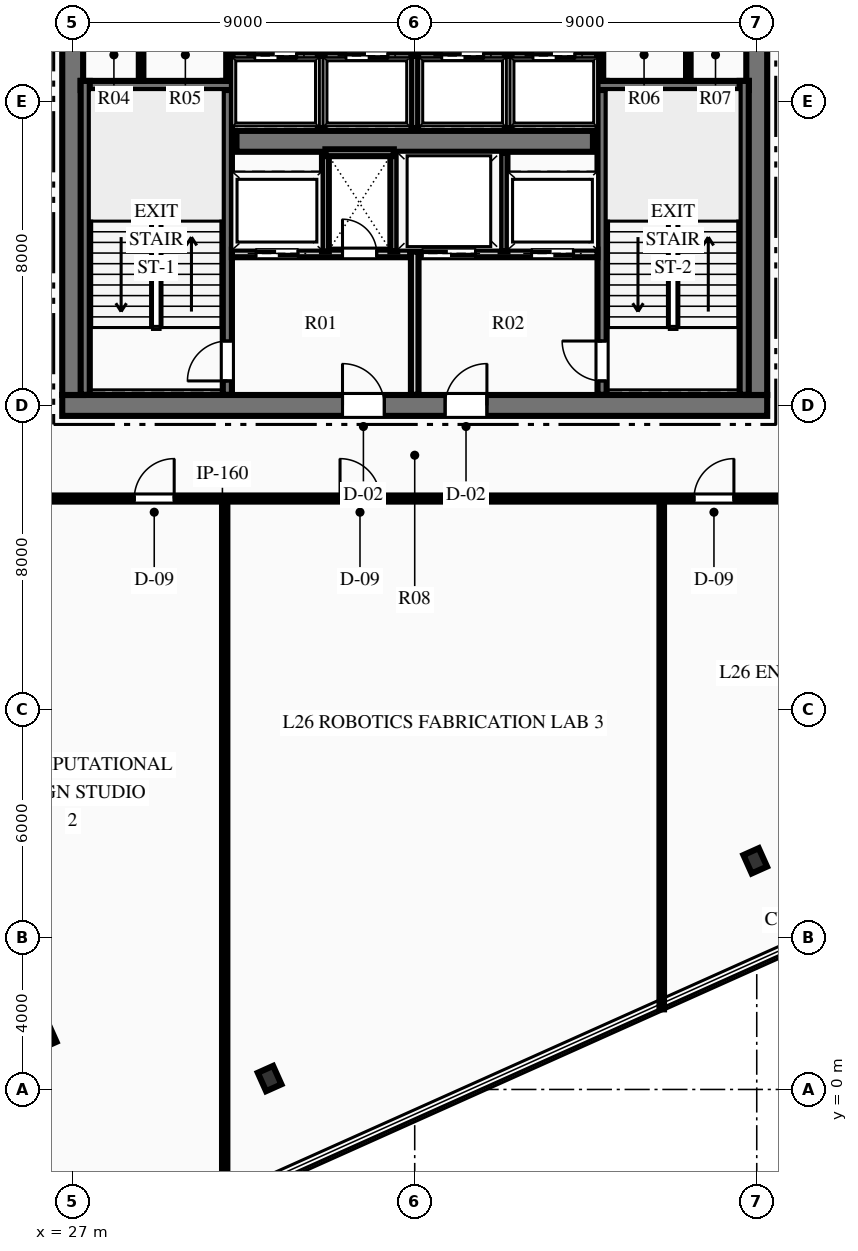
"""IFC4 building model, lengths in metres.
Left out: names, types, materials, properties, quantities, classifications, styles, units other than length and angle.
Written with IfcOpenShell. Run it as: python <this file> out.ifc"""

import sys

from ifc_helpers import new_model, si_unit, direction, frame, frame_2d, origin, origin_2d, place, context, subcontext, project, spatial, rectangle, hollow_rectangle, i_section, extrude, element, fill, save


model = new_model("IFC4")
c1 = context("Model", 3, precision=1e-05, world=origin(), true_north=direction((0.0, 1.0)))
c2 = subcontext(c1, "Body", "Model", "MODEL_VIEW")
j1 = project(units=[si_unit("LENGTHUNIT", "METRE"), si_unit("PLANEANGLEUNIT", "RADIAN")], contexts=[c1])
p1 = place(None, origin())
s1 = spatial("IfcSite", under=j1, at=p1, CompositionType="ELEMENT")
p2 = place(p1, origin())
s2 = spatial("IfcBuilding", under=s1, at=p2, CompositionType="ELEMENT")
p3 = place(p2, frame((0.0, 0.0, 109.2)))
s3 = spatial("IfcBuildingStorey", under=s2, at=p3, CompositionType="ELEMENT", Elevation=109.2)
p4 = place(p3, frame((26.725, 18.0, 0.0), z_axis=(0.0, 0.0, 1.0), x_axis=(1.0, 0.0, 0.0)))
e1 = element("IfcWall", 1, at=p4, inside=s3, PredefinedType="SHEAR", context=c2, shape_type="SweptSolid", body=[
    extrude(rectangle(XDim=18.55, YDim=0.55, at=frame_2d((9.275, 0.0))), origin(), (0.0, 0.0, 1.0), 3.75),
])
p5 = place(p4, frame((7.375, 0.0, 0.0)))
e2 = element("IfcOpeningElement", 2, at=p5, cuts=e1, PredefinedType="OPENING", context=c2, shape_type="SweptSolid", body=[
    extrude(rectangle(XDim=1.1, YDim=2.15, at=frame_2d((0.55, 1.075))), frame((0.0, 0.285, 0.0), z_axis=(0.0, -1.0, 0.0), x_axis=(1.0, 0.0, 0.0)), (0.0, 0.0, 1.0), 0.57),
])
p6 = place(p4, frame((10.075, 0.0, 0.0)))
e3 = element("IfcOpeningElement", 3, at=p6, cuts=e1, PredefinedType="OPENING", context=c2, shape_type="SweptSolid", body=[
    extrude(rectangle(XDim=1.1, YDim=2.15, at=frame_2d((0.55, 1.075))), frame((0.0, 0.285, 0.0), z_axis=(0.0, -1.0, 0.0), x_axis=(1.0, 0.0, 0.0)), (0.0, 0.0, 1.0), 0.57),
])
p7 = place(p3, frame((27.0, 18.275, 0.0), z_axis=(0.0, 0.0, 1.0), x_axis=(0.0, 1.0, 0.0)))
e4 = element("IfcWall", 4, at=p7, inside=s3, PredefinedType="SHEAR", context=c2, shape_type="SweptSolid", body=[
    extrude(rectangle(XDim=15.45, YDim=0.55, at=frame_2d((7.725, 0.0))), origin(), (0.0, 0.0, 1.0), 3.75),
])
p8 = place(p7, frame((9.965, 0.0, 0.0)))
e5 = element("IfcOpeningElement", 5, at=p8, cuts=e4, PredefinedType="OPENING", context=c2, shape_type="SweptSolid", body=[
    extrude(rectangle(XDim=1.4, YDim=2.2, at=frame_2d((0.7, 1.1))), frame((0.0, 0.285, 0.0), z_axis=(0.0, -1.0, 0.0), x_axis=(1.0, 0.0, 0.0)), (0.0, 0.0, 1.0), 0.57),
])
p9 = place(p3, frame((45.0, 18.275, 0.0), z_axis=(0.0, 0.0, 1.0), x_axis=(0.0, 1.0, 0.0)))
e6 = element("IfcWall", 6, at=p9, inside=s3, PredefinedType="SHEAR", context=c2, shape_type="SweptSolid", body=[
    extrude(rectangle(XDim=15.45, YDim=0.55, at=frame_2d((7.725, 0.0))), origin(), (0.0, 0.0, 1.0), 3.75),
])
p10 = place(p9, frame((9.965, 0.0, 0.0)))
e7 = element("IfcOpeningElement", 7, at=p10, cuts=e6, PredefinedType="OPENING", context=c2, shape_type="SweptSolid", body=[
    extrude(rectangle(XDim=1.4, YDim=2.2, at=frame_2d((0.7, 1.1))), frame((0.0, 0.285, 0.0), z_axis=(0.0, -1.0, 0.0), x_axis=(1.0, 0.0, 0.0)), (0.0, 0.0, 1.0), 0.57),
])
p11 = place(p3, frame((31.31, 24.95, 0.0), z_axis=(0.0, 0.0, 1.0), x_axis=(1.0, 0.0, 0.0)))
e8 = element("IfcWall", 8, at=p11, inside=s3, PredefinedType="SHEAR", context=c2, shape_type="SweptSolid", body=[
    extrude(rectangle(XDim=9.38, YDim=0.55, at=frame_2d((4.69, 0.0))), origin(), (0.0, 0.0, 1.0), 3.75),
])
p12 = place(p3, frame((31.07, 18.28, 0.0), z_axis=(0.0, 0.0, 1.0), x_axis=(0.0, 1.0, 0.0)))
e9 = element("IfcWall", 9, at=p12, inside=s3, PredefinedType="SHEAR", context=c2, shape_type="SweptSolid", body=[
    extrude(rectangle(XDim=8.26, YDim=0.24, at=frame_2d((4.13, 0.0))), origin(), (0.0, 0.0, 1.0), 3.75),
])
p13 = place(p12, frame((0.365, 0.0, 0.0)))
e10 = element("IfcOpeningElement", 10, at=p13, cuts=e9, PredefinedType="OPENING", context=c2, shape_type="SweptSolid", body=[
    extrude(rectangle(XDim=1.05, YDim=2.15, at=frame_2d((0.525, 1.075))), frame((0.0, 0.13, 0.0), z_axis=(0.0, -1.0, 0.0), x_axis=(1.0, 0.0, 0.0)), (0.0, 0.0, 1.0), 0.26),
])
p14 = place(p3, frame((27.21, 26.42, 0.0), z_axis=(0.0, 0.0, 1.0), x_axis=(1.0, 0.0, 0.0)))
e11 = element("IfcWall", 11, at=p14, inside=s3, PredefinedType="SHEAR", context=c2, shape_type="SweptSolid", body=[
    extrude(rectangle(XDim=3.98, YDim=0.24, at=frame_2d((1.99, 0.0))), origin(), (0.0, 0.0, 1.0), 3.75),
])
p15 = place(p3, frame((27.33, 18.28, 0.0), z_axis=(0.0, 0.0, 1.0), x_axis=(0.0, 1.0, 0.0)))
e12 = element("IfcWall", 12, at=p15, inside=s3, PredefinedType="SHEAR", context=c2, shape_type="SweptSolid", body=[
    extrude(rectangle(XDim=8.26, YDim=0.24, at=frame_2d((4.13, 0.0))), origin(), (0.0, 0.0, 1.0), 3.75),
])
p16 = place(p3, frame((40.93, 18.28, 0.0), z_axis=(0.0, 0.0, 1.0), x_axis=(0.0, 1.0, 0.0)))
e13 = element("IfcWall", 13, at=p16, inside=s3, PredefinedType="SHEAR", context=c2, shape_type="SweptSolid", body=[
    extrude(rectangle(XDim=8.26, YDim=0.24, at=frame_2d((4.13, 0.0))), origin(), (0.0, 0.0, 1.0), 3.75),
])
p17 = place(p16, frame((0.365, 0.0, 0.0)))
e14 = element("IfcOpeningElement", 14, at=p17, cuts=e13, PredefinedType="OPENING", context=c2, shape_type="SweptSolid", body=[
    extrude(rectangle(XDim=1.05, YDim=2.15, at=frame_2d((0.525, 1.075))), frame((0.0, 0.13, 0.0), z_axis=(0.0, -1.0, 0.0), x_axis=(1.0, 0.0, 0.0)), (0.0, 0.0, 1.0), 0.26),
])
p18 = place(p3, frame((40.81, 26.42, 0.0), z_axis=(0.0, 0.0, 1.0), x_axis=(1.0, 0.0, 0.0)))
e15 = element("IfcWall", 15, at=p18, inside=s3, PredefinedType="SHEAR", context=c2, shape_type="SweptSolid", body=[
    extrude(rectangle(XDim=3.98, YDim=0.24, at=frame_2d((1.99, 0.0))), origin(), (0.0, 0.0, 1.0), 3.75),
])
p19 = place(p3, frame((44.67, 18.28, 0.0), z_axis=(0.0, 0.0, 1.0), x_axis=(0.0, 1.0, 0.0)))
e16 = element("IfcWall", 16, at=p19, inside=s3, PredefinedType="SHEAR", context=c2, shape_type="SweptSolid", body=[
    extrude(rectangle(XDim=8.26, YDim=0.24, at=frame_2d((4.13, 0.0))), origin(), (0.0, 0.0, 1.0), 3.75),
])
p20 = place(p3, frame((25.617, 1.618, 0.0), z_axis=(0.0, 0.0, 1.0), x_axis=(0.912477494148, 0.409126902895, 0.0)))
e17 = element("IfcColumn", 17, at=p20, inside=s3, PredefinedType="COLUMN", context=c2, shape_type="SweptSolid", body=[
    extrude(hollow_rectangle(XDim=1.45, YDim=1.45, WallThickness=0.07, at=origin_2d()), origin(), (0.0, 0.0, 1.0), 3.75),
])
for number, where, z_axis, x_axis in (
    (18, (32.181, 0.287, 0.0), (0.0, 0.0, 1.0), (0.912, 0.409, 0.0)),
    (19, (44.96, 6.017, 0.0), (0.0, 0.0, 1.0), (0.912, 0.409, 0.0)),
):
    element("IfcColumn", number, at=place(p3, frame(where, z_axis=z_axis, x_axis=x_axis)), inside=s3, PredefinedType="COLUMN", context=c2, shape_type="SweptSolid", body=[
        extrude(i_section(OverallWidth=0.442, OverallDepth=0.531, WebThickness=0.066, FlangeThickness=0.106, at=origin_2d()), origin(), (0.0, 0.0, 1.0), 3.75),
    ])
p21 = place(p3, frame((36.0, 18.28, 0.0), z_axis=(0.0, 0.0, 1.0), x_axis=(0.0, 1.0, 0.0)))
e20 = element("IfcWall", 20, at=p21, inside=s3, PredefinedType="PARTITIONING", context=c2, shape_type="SweptSolid", body=[
    extrude(rectangle(XDim=3.77, YDim=0.2, at=frame_2d((1.885, 0.0))), origin(), (0.0, 0.0, 1.0), 3.45),
])
p22 = place(p3, frame((31.19, 22.0, 0.0), z_axis=(0.0, 0.0, 1.0), x_axis=(1.0, 0.0, 0.0)))
e21 = element("IfcWall", 21, at=p22, inside=s3, PredefinedType="PARTITIONING", context=c2, shape_type="SweptSolid", body=[
    extrude(rectangle(XDim=4.69, YDim=0.2, at=frame_2d((2.345, 0.0))), origin(), (0.0, 0.0, 1.0), 3.45),
])
p23 = place(p22, frame((2.91, 0.0, 0.0)))
e22 = element("IfcOpeningElement", 22, at=p23, cuts=e21, PredefinedType="OPENING", context=c2, shape_type="SweptSolid", body=[
    extrude(rectangle(XDim=0.9, YDim=2.15, at=frame_2d((0.45, 1.075))), frame((0.0, 0.11, 0.0), z_axis=(0.0, -1.0, 0.0), x_axis=(1.0, 0.0, 0.0)), (0.0, 0.0, 1.0), 0.22),
])
p24 = place(p22, frame((0.635, 0.0, 0.0)))
e23 = element("IfcOpeningElement", 23, at=p24, cuts=e21, PredefinedType="OPENING", context=c2, shape_type="SweptSolid", body=[
    extrude(rectangle(XDim=1.1, YDim=2.15, at=frame_2d((0.55, 1.075))), frame((0.0, 0.11, 0.0), z_axis=(0.0, -1.0, 0.0), x_axis=(1.0, 0.0, 0.0)), (0.0, 0.0, 1.0), 0.22),
])
p25 = place(p3, frame((36.12, 22.0, 0.0), z_axis=(0.0, 0.0, 1.0), x_axis=(1.0, 0.0, 0.0)))
e24 = element("IfcWall", 24, at=p25, inside=s3, PredefinedType="PARTITIONING", context=c2, shape_type="SweptSolid", body=[
    extrude(rectangle(XDim=4.69, YDim=0.2, at=frame_2d((2.345, 0.0))), origin(), (0.0, 0.0, 1.0), 3.45),
])
p26 = place(p25, frame((2.955, 0.0, 0.0)))
e25 = element("IfcOpeningElement", 25, at=p26, cuts=e24, PredefinedType="OPENING", context=c2, shape_type="SweptSolid", body=[
    extrude(rectangle(XDim=1.1, YDim=2.15, at=frame_2d((0.55, 1.075))), frame((0.0, 0.11, 0.0), z_axis=(0.0, -1.0, 0.0), x_axis=(1.0, 0.0, 0.0)), (0.0, 0.0, 1.0), 0.22),
])
p27 = place(p25, frame((0.08, 0.0, 0.0)))
e26 = element("IfcOpeningElement", 26, at=p27, cuts=e24, PredefinedType="OPENING", context=c2, shape_type="SweptSolid", body=[
    extrude(rectangle(XDim=1.4, YDim=2.2, at=frame_2d((0.7, 1.1))), frame((0.0, 0.11, 0.0), z_axis=(0.0, -1.0, 0.0), x_axis=(1.0, 0.0, 0.0)), (0.0, 0.0, 1.0), 0.22),
])
for number, where, z_axis, x_axis in (
    (27, (33.65, 22.05, 0.0), (0.0, 0.0, 1.0), (0.0, 1.0, 0.0)),
    (28, (35.45, 22.05, 0.0), (0.0, 0.0, 1.0), (0.0, 1.0, 0.0)),
):
    element("IfcWall", number, at=place(p3, frame(where, z_axis=z_axis, x_axis=x_axis)), inside=s3, PredefinedType="PARTITIONING", context=c2, shape_type="SweptSolid", body=[
        extrude(rectangle(XDim=2.6, YDim=0.18, at=frame_2d((1.3, 0.0))), origin(), (0.0, 0.0, 1.0), 3.45),
    ])
p28 = place(p3, frame((33.65, 24.65, 0.0), z_axis=(0.0, 0.0, 1.0), x_axis=(1.0, 0.0, 0.0)))
e29 = element("IfcWall", 29, at=p28, inside=s3, PredefinedType="PARTITIONING", context=c2, shape_type="SweptSolid", body=[
    extrude(rectangle(XDim=1.8, YDim=0.18, at=frame_2d((0.9, 0.0))), origin(), (0.0, 0.0, 1.0), 3.45),
])
p29 = place(p3, frame((38.35, 22.05, 0.0), z_axis=(0.0, 0.0, 1.0), x_axis=(0.0, 1.0, 0.0)))
e30 = element("IfcWall", 30, at=p29, inside=s3, PredefinedType="PARTITIONING", context=c2, shape_type="SweptSolid", body=[
    extrude(rectangle(XDim=2.6, YDim=0.18, at=frame_2d((1.3, 0.0))), origin(), (0.0, 0.0, 1.0), 3.45),
])
for number, where, z_axis, x_axis in (
    (31, (31.12, 26.54, 0.0), (0.0, 0.0, 1.0), (0.0, 1.0, 0.0)),
    (32, (40.88, 26.54, 0.0), (0.0, 0.0, 1.0), (0.0, 1.0, 0.0)),
):
    element("IfcWall", number, at=place(p3, frame(where, z_axis=z_axis, x_axis=x_axis)), inside=s3, PredefinedType="PARTITIONING", context=c2, shape_type="SweptSolid", body=[
        extrude(rectangle(XDim=1.51, YDim=0.16, at=frame_2d((0.755, 0.0))), origin(), (0.0, 0.0, 1.0), 3.45),
    ])
for number, where, z_axis, x_axis in (
    (33, (28.8, 26.54, 0.0), (0.0, 0.0, 1.0), (0.0, 1.0, 0.0)),
    (34, (43.2, 26.54, 0.0), (0.0, 0.0, 1.0), (0.0, 1.0, 0.0)),
):
    element("IfcWall", number, at=place(p3, frame(where, z_axis=z_axis, x_axis=x_axis)), inside=s3, PredefinedType="PARTITIONING", context=c2, shape_type="SweptSolid", body=[
        extrude(rectangle(XDim=1.44, YDim=0.12, at=frame_2d((0.72, 0.0))), origin(), (0.0, 0.0, 1.0), 3.45),
    ])
p30 = place(p3, frame((31.2, 27.2, 0.0), z_axis=(0.0, 0.0, 1.0), x_axis=(1.0, 0.0, 0.0)))
e35 = element("IfcWall", 35, at=p30, inside=s3, PredefinedType="PARTITIONING", context=c2, shape_type="SweptSolid", body=[
    extrude(rectangle(XDim=9.6, YDim=0.18, at=frame_2d((4.8, 0.0))), origin(), (0.0, 0.0, 1.0), 3.45),
])
p31 = place(p30, frame((0.59, 0.0, 0.0)))
e36 = element("IfcOpeningElement", 36, at=p31, cuts=e35, PredefinedType="OPENING", context=c2, shape_type="SweptSolid", body=[
    extrude(rectangle(XDim=1.1, YDim=2.15, at=frame_2d((0.55, 1.075))), frame((0.0, 0.1, 0.0), z_axis=(0.0, -1.0, 0.0), x_axis=(1.0, 0.0, 0.0)), (0.0, 0.0, 1.0), 0.2),
])
p32 = place(p30, frame((2.99, 0.0, 0.0)))
e37 = element("IfcOpeningElement", 37, at=p32, cuts=e35, PredefinedType="OPENING", context=c2, shape_type="SweptSolid", body=[
    extrude(rectangle(XDim=1.1, YDim=2.15, at=frame_2d((0.55, 1.075))), frame((0.0, 0.1, 0.0), z_axis=(0.0, -1.0, 0.0), x_axis=(1.0, 0.0, 0.0)), (0.0, 0.0, 1.0), 0.2),
])
p33 = place(p30, frame((5.51, 0.0, 0.0)))
e38 = element("IfcOpeningElement", 38, at=p33, cuts=e35, PredefinedType="OPENING", context=c2, shape_type="SweptSolid", body=[
    extrude(rectangle(XDim=1.1, YDim=2.15, at=frame_2d((0.55, 1.075))), frame((0.0, 0.1, 0.0), z_axis=(0.0, -1.0, 0.0), x_axis=(1.0, 0.0, 0.0)), (0.0, 0.0, 1.0), 0.2),
])
p34 = place(p30, frame((7.91, 0.0, 0.0)))
e39 = element("IfcOpeningElement", 39, at=p34, cuts=e35, PredefinedType="OPENING", context=c2, shape_type="SweptSolid", body=[
    extrude(rectangle(XDim=1.1, YDim=2.15, at=frame_2d((0.55, 1.075))), frame((0.0, 0.1, 0.0), z_axis=(0.0, -1.0, 0.0), x_axis=(1.0, 0.0, 0.0)), (0.0, 0.0, 1.0), 0.2),
])
for number, where, z_axis, x_axis in (
    (40, (33.54, 25.3, 0.0), (0.0, 0.0, 1.0), (0.0, 1.0, 0.0)),
    (41, (36.0, 25.3, 0.0), (0.0, 0.0, 1.0), (0.0, 1.0, 0.0)),
    (42, (38.46, 25.3, 0.0), (0.0, 0.0, 1.0), (0.0, 1.0, 0.0)),
):
    element("IfcWall", number, at=place(p3, frame(where, z_axis=z_axis, x_axis=x_axis)), inside=s3, PredefinedType="PARTITIONING", context=c2, shape_type="SweptSolid", body=[
        extrude(rectangle(XDim=1.9, YDim=0.18, at=frame_2d((0.95, 0.0))), origin(), (0.0, 0.0, 1.0), 3.45),
    ])
p35 = place(p3, frame((24.5, 15.55, 0.0), z_axis=(0.0, 0.0, 1.0), x_axis=(1.0, 0.0, 0.0)))
e43 = element("IfcWall", 43, at=p35, inside=s3, PredefinedType="PARTITIONING", context=c2, shape_type="SweptSolid", body=[
    extrude(rectangle(XDim=23.0, YDim=0.16, at=frame_2d((11.5, 0.0))), origin(), (0.0, 0.0, 1.0), 3.45),
])
p36 = place(p35, frame((4.121, 0.0, 0.0)))
e44 = element("IfcOpeningElement", 44, at=p36, cuts=e43, PredefinedType="OPENING", context=c2, shape_type="SweptSolid", body=[
    extrude(rectangle(XDim=1.05, YDim=2.15, at=frame_2d((0.525, 1.075))), frame((0.0, 0.09, 0.0), z_axis=(0.0, -1.0, 0.0), x_axis=(1.0, 0.0, 0.0)), (0.0, 0.0, 1.0), 0.18),
])
p37 = place(p35, frame((9.535, 0.0, 0.0)))
e45 = element("IfcOpeningElement", 45, at=p37, cuts=e43, PredefinedType="OPENING", context=c2, shape_type="SweptSolid", body=[
    extrude(rectangle(XDim=1.05, YDim=2.15, at=frame_2d((0.525, 1.075))), frame((0.0, 0.09, 0.0), z_axis=(0.0, -1.0, 0.0), x_axis=(1.0, 0.0, 0.0)), (0.0, 0.0, 1.0), 0.18),
])
p38 = place(p35, frame((18.849, 0.0, 0.0)))
e46 = element("IfcOpeningElement", 46, at=p38, cuts=e43, PredefinedType="OPENING", context=c2, shape_type="SweptSolid", body=[
    extrude(rectangle(XDim=1.05, YDim=2.15, at=frame_2d((0.525, 1.075))), frame((0.0, 0.09, 0.0), z_axis=(0.0, -1.0, 0.0), x_axis=(1.0, 0.0, 0.0)), (0.0, 0.0, 1.0), 0.18),
])
p39 = place(p3, frame((31.0, -3.048, 0.0), z_axis=(0.0, 0.0, 1.0), x_axis=(0.0, 1.0, 0.0)))
e47 = element("IfcWall", 47, at=p39, inside=s3, PredefinedType="PARTITIONING", context=c2, shape_type="SweptSolid", body=[
    extrude(rectangle(XDim=18.598, YDim=0.14, at=frame_2d((9.299, 0.0))), origin(), (0.0, 0.0, 1.0), 3.45),
])
p40 = place(p3, frame((42.5, 2.108, 0.0), z_axis=(0.0, 0.0, 1.0), x_axis=(0.0, 1.0, 0.0)))
e48 = element("IfcWall", 48, at=p40, inside=s3, PredefinedType="PARTITIONING", context=c2, shape_type="SweptSolid", body=[
    extrude(rectangle(XDim=13.442, YDim=0.12, at=frame_2d((6.721, 0.0))), origin(), (0.0, 0.0, 1.0), 3.45),
])
p41 = place(p13, origin())
e49 = element("IfcDoor", 49, at=p41, inside=s3, OperationType="SINGLE_SWING_LEFT", PredefinedType="DOOR", context=c2, shape_type="SweptSolid", body=[
    extrude(rectangle(XDim=1.05, YDim=2.15, at=frame_2d((0.525, 1.075))), frame((0.0, 0.025, 0.0), z_axis=(0.0, -1.0, 0.0), x_axis=(1.0, 0.0, 0.0)), (0.0, 0.0, 1.0), 0.05),
])
fill(e10, e49)
p42 = place(p17, origin())
e50 = element("IfcDoor", 50, at=p42, inside=s3, OperationType="SINGLE_SWING_RIGHT", PredefinedType="DOOR", context=c2, shape_type="SweptSolid", body=[
    extrude(rectangle(XDim=1.05, YDim=2.15, at=frame_2d((0.525, 1.075))), frame((0.0, 0.025, 0.0), z_axis=(0.0, -1.0, 0.0), x_axis=(1.0, 0.0, 0.0)), (0.0, 0.0, 1.0), 0.05),
])
fill(e14, e50)
p43 = place(p5, origin())
e51 = element("IfcDoor", 51, at=p43, inside=s3, OperationType="SINGLE_SWING_LEFT", PredefinedType="DOOR", context=c2, shape_type="SweptSolid", body=[
    extrude(rectangle(XDim=1.1, YDim=2.15, at=frame_2d((0.55, 1.075))), frame((0.0, 0.025, 0.0), z_axis=(0.0, -1.0, 0.0), x_axis=(1.0, 0.0, 0.0)), (0.0, 0.0, 1.0), 0.05),
])
fill(e2, e51)
p44 = place(p6, origin())
e52 = element("IfcDoor", 52, at=p44, inside=s3, OperationType="SINGLE_SWING_RIGHT", PredefinedType="DOOR", context=c2, shape_type="SweptSolid", body=[
    extrude(rectangle(XDim=1.1, YDim=2.15, at=frame_2d((0.55, 1.075))), frame((0.0, 0.025, 0.0), z_axis=(0.0, -1.0, 0.0), x_axis=(1.0, 0.0, 0.0)), (0.0, 0.0, 1.0), 0.05),
])
fill(e3, e52)
p45 = place(p23, origin())
e53 = element("IfcDoor", 53, at=p45, inside=s3, OperationType="SINGLE_SWING_LEFT", PredefinedType="DOOR", context=c2, shape_type="SweptSolid", body=[
    extrude(rectangle(XDim=0.9, YDim=2.15, at=frame_2d((0.45, 1.075))), frame((0.0, 0.025, 0.0), z_axis=(0.0, -1.0, 0.0), x_axis=(1.0, 0.0, 0.0)), (0.0, 0.0, 1.0), 0.05),
])
fill(e22, e53)
p46 = place(p36, origin())
e54 = element("IfcDoor", 54, at=p46, inside=s3, OperationType="SINGLE_SWING_RIGHT", PredefinedType="DOOR", context=c2, shape_type="SweptSolid", body=[
    extrude(rectangle(XDim=1.05, YDim=2.15, at=frame_2d((0.525, 1.075))), frame((0.0, 0.025, 0.0), z_axis=(0.0, -1.0, 0.0), x_axis=(1.0, 0.0, 0.0)), (0.0, 0.0, 1.0), 0.05),
])
fill(e44, e54)
p47 = place(p37, origin())
e55 = element("IfcDoor", 55, at=p47, inside=s3, OperationType="SINGLE_SWING_LEFT", PredefinedType="DOOR", context=c2, shape_type="SweptSolid", body=[
    extrude(rectangle(XDim=1.05, YDim=2.15, at=frame_2d((0.525, 1.075))), frame((0.0, 0.025, 0.0), z_axis=(0.0, -1.0, 0.0), x_axis=(1.0, 0.0, 0.0)), (0.0, 0.0, 1.0), 0.05),
])
fill(e45, e55)
p48 = place(p38, origin())
e56 = element("IfcDoor", 56, at=p48, inside=s3, OperationType="SINGLE_SWING_RIGHT", PredefinedType="DOOR", context=c2, shape_type="SweptSolid", body=[
    extrude(rectangle(XDim=1.05, YDim=2.15, at=frame_2d((0.525, 1.075))), frame((0.0, 0.025, 0.0), z_axis=(0.0, -1.0, 0.0), x_axis=(1.0, 0.0, 0.0)), (0.0, 0.0, 1.0), 0.05),
])
fill(e46, e56)
p49 = place(p31, origin())
e57 = element("IfcDoor", 57, at=p49, inside=s3, OperationType="SLIDING_TO_LEFT", PredefinedType="DOOR", context=c2, shape_type="SweptSolid", body=[
    extrude(rectangle(XDim=1.1, YDim=2.15, at=frame_2d((0.55, 1.075))), frame((0.0, 0.025, 0.0), z_axis=(0.0, -1.0, 0.0), x_axis=(1.0, 0.0, 0.0)), (0.0, 0.0, 1.0), 0.05),
])
fill(e36, e57)
p50 = place(p32, origin())
e58 = element("IfcDoor", 58, at=p50, inside=s3, OperationType="SLIDING_TO_LEFT", PredefinedType="DOOR", context=c2, shape_type="SweptSolid", body=[
    extrude(rectangle(XDim=1.1, YDim=2.15, at=frame_2d((0.55, 1.075))), frame((0.0, 0.025, 0.0), z_axis=(0.0, -1.0, 0.0), x_axis=(1.0, 0.0, 0.0)), (0.0, 0.0, 1.0), 0.05),
])
fill(e37, e58)
p51 = place(p33, origin())
e59 = element("IfcDoor", 59, at=p51, inside=s3, OperationType="SLIDING_TO_LEFT", PredefinedType="DOOR", context=c2, shape_type="SweptSolid", body=[
    extrude(rectangle(XDim=1.1, YDim=2.15, at=frame_2d((0.55, 1.075))), frame((0.0, 0.025, 0.0), z_axis=(0.0, -1.0, 0.0), x_axis=(1.0, 0.0, 0.0)), (0.0, 0.0, 1.0), 0.05),
])
fill(e38, e59)
p52 = place(p34, origin())
e60 = element("IfcDoor", 60, at=p52, inside=s3, OperationType="SLIDING_TO_LEFT", PredefinedType="DOOR", context=c2, shape_type="SweptSolid", body=[
    extrude(rectangle(XDim=1.1, YDim=2.15, at=frame_2d((0.55, 1.075))), frame((0.0, 0.025, 0.0), z_axis=(0.0, -1.0, 0.0), x_axis=(1.0, 0.0, 0.0)), (0.0, 0.0, 1.0), 0.05),
])
fill(e39, e60)
p53 = place(p24, origin())
e61 = element("IfcDoor", 61, at=p53, inside=s3, OperationType="SLIDING_TO_LEFT", PredefinedType="DOOR", context=c2, shape_type="SweptSolid", body=[
    extrude(rectangle(XDim=1.1, YDim=2.15, at=frame_2d((0.55, 1.075))), frame((0.0, 0.025, 0.0), z_axis=(0.0, -1.0, 0.0), x_axis=(1.0, 0.0, 0.0)), (0.0, 0.0, 1.0), 0.05),
])
fill(e23, e61)
p54 = place(p26, origin())
e62 = element("IfcDoor", 62, at=p54, inside=s3, OperationType="SLIDING_TO_LEFT", PredefinedType="DOOR", context=c2, shape_type="SweptSolid", body=[
    extrude(rectangle(XDim=1.1, YDim=2.15, at=frame_2d((0.55, 1.075))), frame((0.0, 0.025, 0.0), z_axis=(0.0, -1.0, 0.0), x_axis=(1.0, 0.0, 0.0)), (0.0, 0.0, 1.0), 0.05),
])
fill(e25, e62)
p55 = place(p27, origin())
e63 = element("IfcDoor", 63, at=p55, inside=s3, OperationType="SLIDING_TO_LEFT", PredefinedType="DOOR", context=c2, shape_type="SweptSolid", body=[
    extrude(rectangle(XDim=1.4, YDim=2.2, at=frame_2d((0.7, 1.1))), frame((0.0, 0.025, 0.0), z_axis=(0.0, -1.0, 0.0), x_axis=(1.0, 0.0, 0.0)), (0.0, 0.0, 1.0), 0.05),
])
fill(e26, e63)
save(model, sys.argv[1])
